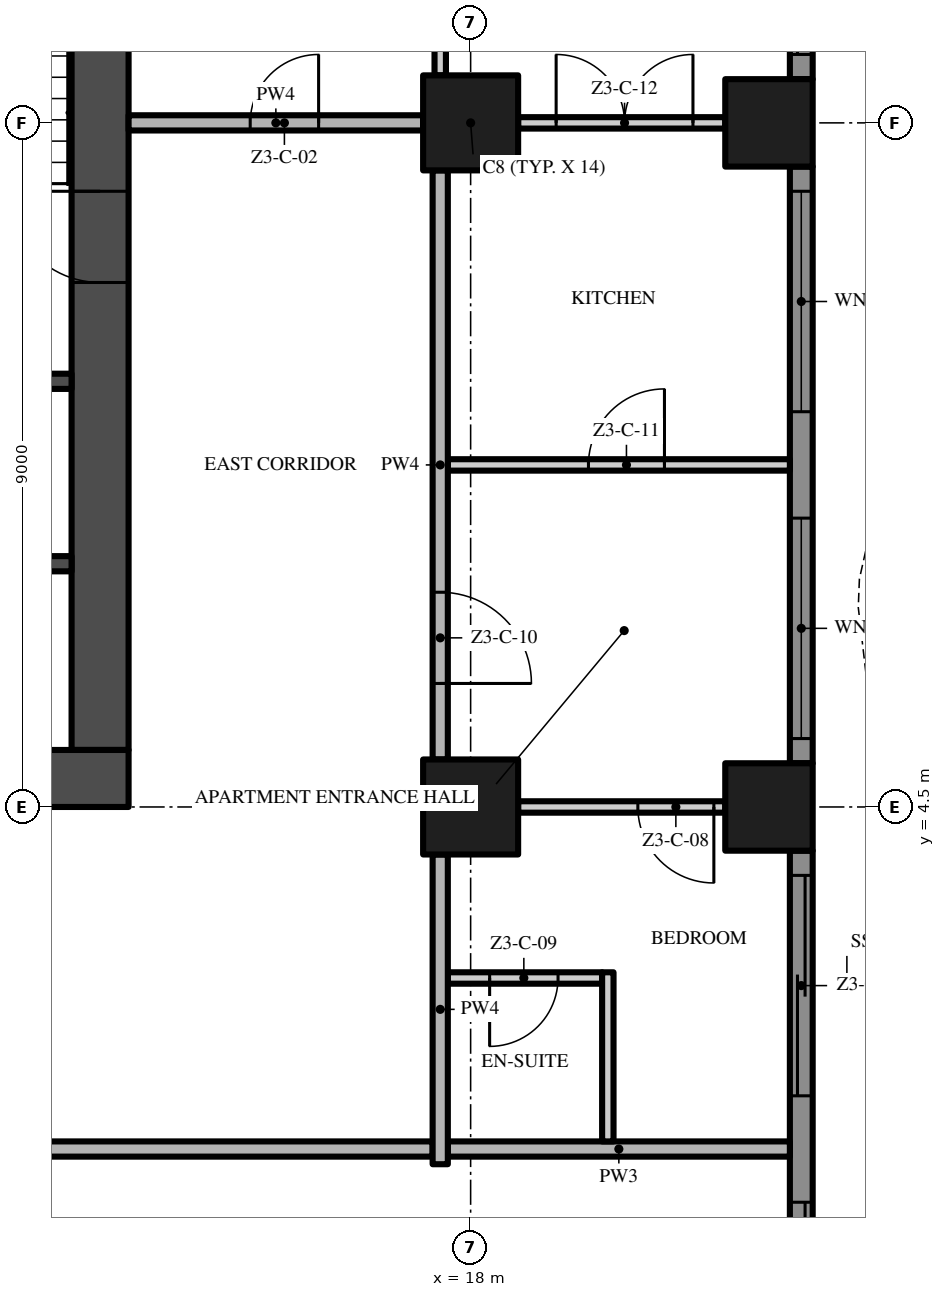
"""IFC4 building model, lengths in metres.
Left out: names, types, materials, properties, quantities, classifications, styles, units other than length and angle.
Written with IfcOpenShell. Run it as: python <this file> out.ifc"""

import sys

from ifc_helpers import new_model, si_unit, direction, frame, frame_2d, origin, origin_2d, place, context, subcontext, project, spatial, polyline, rectangle, outline, extrude, element, fill, save


model = new_model("IFC4")
c1 = context("Model", 3, precision=1e-05, world=origin(), true_north=direction((0.0, 1.0)))
c2 = subcontext(c1, "Body", "Model", "MODEL_VIEW")
j1 = project(units=[si_unit("LENGTHUNIT", "METRE"), si_unit("PLANEANGLEUNIT", "RADIAN")], contexts=[c1])
p1 = place(None, origin())
s1 = spatial("IfcSite", under=j1, at=p1, CompositionType="ELEMENT")
p2 = place(p1, origin())
s2 = spatial("IfcBuilding", under=s1, at=p2, CompositionType="ELEMENT")
p3 = place(p2, frame((0.0, 0.0, 155.4)))
s3 = spatial("IfcBuildingStorey", under=s2, at=p3, CompositionType="ELEMENT", Elevation=155.4)
p4 = place(p3, frame((-13.5, 4.875, -0.3), z_axis=(0.0, 0.0, 1.0), x_axis=(1.0, 0.0, 0.0)))
e1 = element("IfcWall", 1, at=p4, inside=s3, PredefinedType="SHEAR", context=c2, shape_type="SweptSolid", body=[
    extrude(rectangle(XDim=27.0, YDim=0.75, at=frame_2d((13.5, 0.0))), origin(), (0.0, 0.0, 1.0), 3.8),
])
p5 = place(p4, frame((12.0, 0.0, 0.3)))
e2 = element("IfcOpeningElement", 2, at=p5, cuts=e1, PredefinedType="OPENING", context=c2, shape_type="SweptSolid", body=[
    extrude(rectangle(XDim=3.0, YDim=2.4, at=frame_2d((1.5, 1.2))), frame((0.0, 0.385, 0.0), z_axis=(0.0, -1.0, 0.0), x_axis=(1.0, 0.0, 0.0)), (0.0, 0.0, 1.0), 0.77),
])
p6 = place(p4, frame((4.9, 0.0, 0.3)))
e3 = element("IfcOpeningElement", 3, at=p6, cuts=e1, PredefinedType="OPENING", context=c2, shape_type="SweptSolid", body=[
    extrude(rectangle(XDim=1.2, YDim=2.2, at=frame_2d((0.6, 1.1))), frame((0.0, 0.385, 0.0), z_axis=(0.0, -1.0, 0.0), x_axis=(1.0, 0.0, 0.0)), (0.0, 0.0, 1.0), 0.77),
])
p7 = place(p4, frame((20.75, 0.0, 0.3)))
e4 = element("IfcOpeningElement", 4, at=p7, cuts=e1, PredefinedType="OPENING", context=c2, shape_type="SweptSolid", body=[
    extrude(rectangle(XDim=1.5, YDim=2.2, at=frame_2d((0.75, 1.1))), frame((0.0, 0.385, 0.0), z_axis=(0.0, -1.0, 0.0), x_axis=(1.0, 0.0, 0.0)), (0.0, 0.0, 1.0), 0.77),
])
p8 = place(p4, frame((17.4, 0.0, 0.3)))
e5 = element("IfcOpeningElement", 5, at=p8, cuts=e1, PredefinedType="OPENING", context=c2, shape_type="SweptSolid", body=[
    extrude(rectangle(XDim=1.2, YDim=2.2, at=frame_2d((0.6, 1.1))), frame((0.0, 0.385, 0.0), z_axis=(0.0, -1.0, 0.0), x_axis=(1.0, 0.0, 0.0)), (0.0, 0.0, 1.0), 0.77),
])
p9 = place(p3, frame((13.125, 5.25, -0.3), z_axis=(0.0, 0.0, 1.0), x_axis=(0.0, 1.0, 0.0)))
e6 = element("IfcWall", 6, at=p9, inside=s3, PredefinedType="SHEAR", context=c2, shape_type="SweptSolid", body=[
    extrude(rectangle(XDim=16.5, YDim=0.75, at=frame_2d((8.25, 0.0))), origin(), (0.0, 0.0, 1.0), 3.8),
])
p10 = place(p9, frame((6.15, 0.0, 0.3)))
e7 = element("IfcOpeningElement", 7, at=p10, cuts=e6, PredefinedType="OPENING", context=c2, shape_type="SweptSolid", body=[
    extrude(rectangle(XDim=1.2, YDim=2.2, at=frame_2d((0.6, 1.1))), frame((0.0, 0.385, 0.0), z_axis=(0.0, -1.0, 0.0), x_axis=(1.0, 0.0, 0.0)), (0.0, 0.0, 1.0), 0.77),
])
for number, where, z_axis, x_axis in (
    (8, (18.0, 13.5, 0.0), (0.0, 0.0, 1.0), (1.0, 0.0, 0.0)),
    (9, (18.0, 4.5, 0.0), (0.0, 0.0, 1.0), (1.0, 0.0, 0.0)),
):
    element("IfcColumn", number, at=place(p3, frame(where, z_axis=z_axis, x_axis=x_axis)), inside=s3, PredefinedType="COLUMN", context=c2, shape_type="SweptSolid", body=[
        extrude(rectangle(XDim=1.25, YDim=1.25, at=origin_2d()), origin(), (0.0, 0.0, 1.0), 3.5),
    ])
for number, where, z_axis, x_axis in (
    (10, (21.925, 13.5, 0.0), (0.0, 0.0, 1.0), (1.0, 0.0, 0.0)),
    (11, (21.925, 4.5, 0.0), (0.0, 0.0, 1.0), (1.0, 0.0, 0.0)),
):
    element("IfcColumn", number, at=place(p3, frame(where, z_axis=z_axis, x_axis=x_axis)), inside=s3, PredefinedType="COLUMN", context=c2, shape_type="SweptSolid", body=[
        extrude(rectangle(XDim=1.15, YDim=1.15, at=origin_2d()), origin(), (0.0, 0.0, 1.0), 3.5),
    ])
p11 = place(p3, frame((22.35, 3.925, 0.0), z_axis=(0.0, 0.0, 1.0), x_axis=(0.0, -1.0, 0.0)))
e12 = element("IfcWall", 12, at=p11, inside=s3, PredefinedType="SOLIDWALL", context=c2, shape_type="SweptSolid", body=[
    extrude(rectangle(XDim=7.85, YDim=0.3, at=frame_2d((3.925, 0.0))), origin(), (0.0, 0.0, 1.0), 3.5),
])
p12 = place(p11, frame((4.625, 0.0, 0.0)))
e13 = element("IfcOpeningElement", 13, at=p12, cuts=e12, PredefinedType="OPENING", context=c2, shape_type="SweptSolid", body=[
    extrude(rectangle(XDim=2.9, YDim=2.4, at=frame_2d((1.45, 1.2))), frame((0.0, 0.16, 0.0), z_axis=(0.0, -1.0, 0.0), x_axis=(1.0, 0.0, 0.0)), (0.0, 0.0, 1.0), 0.32),
])
p13 = place(p11, frame((0.325, 0.0, 0.0)))
e14 = element("IfcOpeningElement", 14, at=p13, cuts=e12, PredefinedType="OPENING", context=c2, shape_type="SweptSolid", body=[
    extrude(rectangle(XDim=2.9, YDim=2.4, at=frame_2d((1.45, 1.2))), frame((0.0, 0.16, 0.0), z_axis=(0.0, -1.0, 0.0), x_axis=(1.0, 0.0, 0.0)), (0.0, 0.0, 1.0), 0.32),
])
p14 = place(p3, frame((22.35, 12.925, 0.0), z_axis=(0.0, 0.0, 1.0), x_axis=(0.0, -1.0, 0.0)))
e15 = element("IfcWall", 15, at=p14, inside=s3, PredefinedType="SOLIDWALL", context=c2, shape_type="SweptSolid", body=[
    extrude(rectangle(XDim=7.85, YDim=0.3, at=frame_2d((3.925, 0.0))), origin(), (0.0, 0.0, 1.0), 3.5),
])
p15 = place(p14, frame((4.625, 0.0, 0.45)))
e16 = element("IfcOpeningElement", 16, at=p15, cuts=e15, PredefinedType="OPENING", context=c2, shape_type="SweptSolid", body=[
    extrude(rectangle(XDim=2.9, YDim=2.65, at=frame_2d((1.45, 1.325))), frame((0.0, 0.16, 0.0), z_axis=(0.0, -1.0, 0.0), x_axis=(1.0, 0.0, 0.0)), (0.0, 0.0, 1.0), 0.32),
])
p16 = place(p14, frame((0.325, 0.0, 0.45)))
e17 = element("IfcOpeningElement", 17, at=p16, cuts=e15, PredefinedType="OPENING", context=c2, shape_type="SweptSolid", body=[
    extrude(rectangle(XDim=2.9, YDim=2.65, at=frame_2d((1.45, 1.325))), frame((0.0, 0.16, 0.0), z_axis=(0.0, -1.0, 0.0), x_axis=(1.0, 0.0, 0.0)), (0.0, 0.0, 1.0), 0.32),
])
p17 = place(p3, frame((22.35, 18.0, 0.0), z_axis=(0.0, 0.0, 1.0), x_axis=(0.0, -1.0, 0.0)))
e18 = element("IfcWall", 18, at=p17, inside=s3, PredefinedType="SOLIDWALL", context=c2, shape_type="SweptSolid", body=[
    extrude(rectangle(XDim=3.925, YDim=0.3, at=frame_2d((1.962, 0.0))), origin(), (0.0, 0.0, 1.0), 3.5),
])
p18 = place(p17, frame((0.7, 0.0, 0.0)))
e19 = element("IfcOpeningElement", 19, at=p18, cuts=e18, PredefinedType="OPENING", context=c2, shape_type="SweptSolid", body=[
    extrude(rectangle(XDim=2.9, YDim=2.4, at=frame_2d((1.45, 1.2))), frame((0.0, 0.16, 0.0), z_axis=(0.0, -1.0, 0.0), x_axis=(1.0, 0.0, 0.0)), (0.0, 0.0, 1.0), 0.32),
])
p19 = place(p3, origin())
e20 = element("IfcWall", 20, at=p19, inside=s3, PredefinedType="USERDEFINED", context=c2, shape_type="SweptSolid", body=[
    extrude(outline(polyline([(25.149, -13.5), (24.488, -12.0), (23.755, -10.5), (23.231, -9.0), (23.1, -7.875), (23.115, -7.5), (23.451, -6.0), (24.112, -4.5), (24.845, -3.0), (25.369, -1.5), (25.5, -0.375), (25.485, 0.0), (25.149, 1.5), (24.488, 3.0), (23.755, 4.5), (23.231, 6.0), (23.1, 7.125), (23.115, 7.5), (23.451, 9.0), (24.112, 10.5), (24.845, 12.0), (25.369, 13.5), (25.5, 14.625), (25.485, 15.0), (25.149, 16.5), (24.488, 18.0), (24.259, 17.899), (24.91, 16.421), (25.236, 14.967), (25.249, 14.635), (25.124, 13.556), (24.614, 12.096), (23.885, 10.605), (23.213, 9.079), (22.866, 7.533), (22.849, 7.115), (22.986, 5.944), (23.524, 4.404), (24.261, 2.895), (24.91, 1.421), (25.236, -0.033), (25.249, -0.365), (25.124, -1.444), (24.614, -2.904), (23.885, -4.395), (23.213, -5.921), (22.866, -7.467), (22.849, -7.885), (22.986, -9.056), (23.524, -10.596), (24.261, -12.105), (24.92, -13.601), (25.149, -13.5)])), origin(), (0.0, 0.0, 1.0), 0.9),
])
for number, where, z_axis, x_axis in (
    (21, (9.65, 7.7, 0.0), (0.0, 0.0, 1.0), (1.0, 0.0, 0.0)),
    (22, (9.65, 10.1, 0.0), (0.0, 0.0, 1.0), (1.0, 0.0, 0.0)),
):
    element("IfcWall", number, at=place(p3, frame(where, z_axis=z_axis, x_axis=x_axis)), inside=s3, PredefinedType="SHEAR", context=c2, shape_type="SweptSolid", body=[
        extrude(rectangle(XDim=3.1, YDim=0.2, at=frame_2d((1.55, 0.0))), origin(), (0.0, 0.0, 1.0), 3.5),
    ])
p20 = place(p3, frame((17.5, 0.0, 0.0), z_axis=(0.0, 0.0, 1.0), x_axis=(-1.0, 0.0, 0.0)))
e23 = element("IfcWall", 23, at=p20, inside=s3, PredefinedType="PARTITIONING", context=c2, shape_type="SweptSolid", body=[
    extrude(rectangle(XDim=35.0, YDim=0.2, at=frame_2d((17.5, 0.0))), origin(), (0.0, 0.0, 1.0), 3.5),
])
p21 = place(p20, frame((16.75, 0.0, 0.0)))
e24 = element("IfcOpeningElement", 24, at=p21, cuts=e23, PredefinedType="OPENING", context=c2, shape_type="SweptSolid", body=[
    extrude(rectangle(XDim=1.5, YDim=2.4, at=frame_2d((0.75, 1.2))), frame((0.0, 0.11, 0.0), z_axis=(0.0, -1.0, 0.0), x_axis=(1.0, 0.0, 0.0)), (0.0, 0.0, 1.0), 0.22),
])
p22 = place(p3, frame((17.7, 0.0, 0.0), z_axis=(0.0, 0.0, 1.0), x_axis=(1.0, 0.0, 0.0)))
e25 = element("IfcWall", 25, at=p22, inside=s3, PredefinedType="PARTITIONING", context=c2, shape_type="SweptSolid", body=[
    extrude(rectangle(XDim=4.5, YDim=0.2, at=frame_2d((2.25, 0.0))), origin(), (0.0, 0.0, 1.0), 3.5),
])
p23 = place(p3, frame((19.73, 2.25, 0.0), z_axis=(0.0, 0.0, 1.0), x_axis=(-1.0, 0.0, 0.0)))
e26 = element("IfcWall", 26, at=p23, inside=s3, PredefinedType="PARTITIONING", context=c2, shape_type="SweptSolid", body=[
    extrude(rectangle(XDim=2.03, YDim=0.15, at=frame_2d((1.015, 0.0))), origin(), (0.0, 0.0, 1.0), 3.5),
])
p24 = place(p23, frame((0.58, 0.0, 0.0)))
e27 = element("IfcOpeningElement", 27, at=p24, cuts=e26, PredefinedType="OPENING", context=c2, shape_type="SweptSolid", body=[
    extrude(rectangle(XDim=0.9, YDim=2.1, at=frame_2d((0.45, 1.05))), frame((0.0, 0.085, 0.0), z_axis=(0.0, -1.0, 0.0), x_axis=(1.0, 0.0, 0.0)), (0.0, 0.0, 1.0), 0.17),
])
p25 = place(p3, frame((21.35, 4.5, 0.0), z_axis=(0.0, 0.0, 1.0), x_axis=(-1.0, 0.0, 0.0)))
e28 = element("IfcWall", 28, at=p25, inside=s3, PredefinedType="PARTITIONING", context=c2, shape_type="SweptSolid", body=[
    extrude(rectangle(XDim=2.725, YDim=0.15, at=frame_2d((1.363, 0.0))), origin(), (0.0, 0.0, 1.0), 3.5),
])
p26 = place(p25, frame((0.15, 0.0, 0.0)))
e29 = element("IfcOpeningElement", 29, at=p26, cuts=e28, PredefinedType="OPENING", context=c2, shape_type="SweptSolid", body=[
    extrude(rectangle(XDim=1.0, YDim=2.4, at=frame_2d((0.5, 1.2))), frame((0.0, 0.085, 0.0), z_axis=(0.0, -1.0, 0.0), x_axis=(1.0, 0.0, 0.0)), (0.0, 0.0, 1.0), 0.17),
])
p27 = place(p3, frame((17.7, 9.0, 0.0), z_axis=(0.0, 0.0, 1.0), x_axis=(1.0, 0.0, 0.0)))
e30 = element("IfcWall", 30, at=p27, inside=s3, PredefinedType="PARTITIONING", context=c2, shape_type="SweptSolid", body=[
    extrude(rectangle(XDim=4.5, YDim=0.15, at=frame_2d((2.25, 0.0))), origin(), (0.0, 0.0, 1.0), 3.5),
])
p28 = place(p27, frame((1.85, 0.0, 0.0)))
e31 = element("IfcOpeningElement", 31, at=p28, cuts=e30, PredefinedType="OPENING", context=c2, shape_type="SweptSolid", body=[
    extrude(rectangle(XDim=1.0, YDim=2.4, at=frame_2d((0.5, 1.2))), frame((0.0, 0.085, 0.0), z_axis=(0.0, -1.0, 0.0), x_axis=(1.0, 0.0, 0.0)), (0.0, 0.0, 1.0), 0.17),
])
p29 = place(p3, frame((13.5, 13.5, 0.0), z_axis=(0.0, 0.0, 1.0), x_axis=(1.0, 0.0, 0.0)))
e32 = element("IfcWall", 32, at=p29, inside=s3, PredefinedType="PARTITIONING", context=c2, shape_type="SweptSolid", body=[
    extrude(rectangle(XDim=3.875, YDim=0.2, at=frame_2d((1.938, 0.0))), origin(), (0.0, 0.0, 1.0), 3.5),
])
p30 = place(p29, frame((1.6, 0.0, 0.0)))
e33 = element("IfcOpeningElement", 33, at=p30, cuts=e32, PredefinedType="OPENING", context=c2, shape_type="SweptSolid", body=[
    extrude(rectangle(XDim=0.9, YDim=2.1, at=frame_2d((0.45, 1.05))), frame((0.0, 0.11, 0.0), z_axis=(0.0, -1.0, 0.0), x_axis=(1.0, 0.0, 0.0)), (0.0, 0.0, 1.0), 0.22),
])
p31 = place(p3, frame((18.625, 13.5, 0.0), z_axis=(0.0, 0.0, 1.0), x_axis=(1.0, 0.0, 0.0)))
e34 = element("IfcWall", 34, at=p31, inside=s3, PredefinedType="PARTITIONING", context=c2, shape_type="SweptSolid", body=[
    extrude(rectangle(XDim=2.725, YDim=0.15, at=frame_2d((1.363, 0.0))), origin(), (0.0, 0.0, 1.0), 3.5),
])
p32 = place(p31, frame((0.5, 0.0, 0.0)))
e35 = element("IfcOpeningElement", 35, at=p32, cuts=e34, PredefinedType="OPENING", context=c2, shape_type="SweptSolid", body=[
    extrude(rectangle(XDim=1.8, YDim=2.4, at=frame_2d((0.9, 1.2))), frame((0.0, 0.085, 0.0), z_axis=(0.0, -1.0, 0.0), x_axis=(1.0, 0.0, 0.0)), (0.0, 0.0, 1.0), 0.17),
])
p33 = place(p3, frame((17.6, -0.2, 0.0), z_axis=(0.0, 0.0, 1.0), x_axis=(0.0, 1.0, 0.0)))
e36 = element("IfcWall", 36, at=p33, inside=s3, PredefinedType="PARTITIONING", context=c2, shape_type="SweptSolid", body=[
    extrude(rectangle(XDim=4.075, YDim=0.2, at=frame_2d((2.038, 0.0))), origin(), (0.0, 0.0, 1.0), 3.5),
])
p34 = place(p3, frame((17.6, 12.875, 0.0), z_axis=(0.0, 0.0, 1.0), x_axis=(0.0, -1.0, 0.0)))
e37 = element("IfcWall", 37, at=p34, inside=s3, PredefinedType="PARTITIONING", context=c2, shape_type="SweptSolid", body=[
    extrude(rectangle(XDim=7.75, YDim=0.2, at=frame_2d((3.875, 0.0))), origin(), (0.0, 0.0, 1.0), 3.5),
])
p35 = place(p34, frame((5.55, 0.0, 0.0)))
e38 = element("IfcOpeningElement", 38, at=p35, cuts=e37, PredefinedType="OPENING", context=c2, shape_type="SweptSolid", body=[
    extrude(rectangle(XDim=1.2, YDim=2.4, at=frame_2d((0.6, 1.2))), frame((0.0, 0.11, 0.0), z_axis=(0.0, -1.0, 0.0), x_axis=(1.0, 0.0, 0.0)), (0.0, 0.0, 1.0), 0.22),
])
p36 = place(p3, frame((17.6, 14.125, 0.0), z_axis=(0.0, 0.0, 1.0), x_axis=(0.0, 1.0, 0.0)))
e39 = element("IfcWall", 39, at=p36, inside=s3, PredefinedType="PARTITIONING", context=c2, shape_type="SweptSolid", body=[
    extrude(rectangle(XDim=3.3, YDim=0.15, at=frame_2d((1.65, 0.0))), origin(), (0.0, 0.0, 1.0), 3.5),
])
p37 = place(p3, frame((19.805, 0.1, 0.0), z_axis=(0.0, 0.0, 1.0), x_axis=(0.0, 1.0, 0.0)))
e40 = element("IfcWall", 40, at=p37, inside=s3, PredefinedType="PARTITIONING", context=c2, shape_type="SweptSolid", body=[
    extrude(rectangle(XDim=2.225, YDim=0.15, at=frame_2d((1.113, 0.0))), origin(), (0.0, 0.0, 1.0), 3.5),
])
p38 = place(p12, origin())
e41 = element("IfcDoor", 41, at=p38, inside=s3, OperationType="SINGLE_SWING_LEFT", PredefinedType="DOOR", context=c2, shape_type="SweptSolid", body=[
    extrude(rectangle(XDim=2.9, YDim=2.4, at=frame_2d((1.45, 1.2))), frame((0.0, 0.025, 0.0), z_axis=(0.0, -1.0, 0.0), x_axis=(1.0, 0.0, 0.0)), (0.0, 0.0, 1.0), 0.05),
])
fill(e13, e41)
p39 = place(p13, origin())
e42 = element("IfcDoor", 42, at=p39, inside=s3, OperationType="SINGLE_SWING_LEFT", PredefinedType="DOOR", context=c2, shape_type="SweptSolid", body=[
    extrude(rectangle(XDim=2.9, YDim=2.4, at=frame_2d((1.45, 1.2))), frame((0.0, 0.025, 0.0), z_axis=(0.0, -1.0, 0.0), x_axis=(1.0, 0.0, 0.0)), (0.0, 0.0, 1.0), 0.05),
])
fill(e14, e42)
p40 = place(p15, origin())
e43 = element("IfcWindow", 43, at=p40, inside=s3, PartitioningType="SINGLE_PANEL", PredefinedType="WINDOW", context=c2, shape_type="SweptSolid", body=[
    extrude(rectangle(XDim=2.9, YDim=2.65, at=frame_2d((1.45, 1.325))), frame((0.0, 0.03, 0.0), z_axis=(0.0, -1.0, 0.0), x_axis=(1.0, 0.0, 0.0)), (0.0, 0.0, 1.0), 0.06),
])
fill(e16, e43)
p41 = place(p16, origin())
e44 = element("IfcWindow", 44, at=p41, inside=s3, PartitioningType="SINGLE_PANEL", PredefinedType="WINDOW", context=c2, shape_type="SweptSolid", body=[
    extrude(rectangle(XDim=2.9, YDim=2.65, at=frame_2d((1.45, 1.325))), frame((0.0, 0.03, 0.0), z_axis=(0.0, -1.0, 0.0), x_axis=(1.0, 0.0, 0.0)), (0.0, 0.0, 1.0), 0.06),
])
fill(e17, e44)
p42 = place(p18, origin())
e45 = element("IfcDoor", 45, at=p42, inside=s3, OperationType="SINGLE_SWING_LEFT", PredefinedType="DOOR", context=c2, shape_type="SweptSolid", body=[
    extrude(rectangle(XDim=2.9, YDim=2.4, at=frame_2d((1.45, 1.2))), frame((0.0, 0.025, 0.0), z_axis=(0.0, -1.0, 0.0), x_axis=(1.0, 0.0, 0.0)), (0.0, 0.0, 1.0), 0.05),
])
fill(e19, e45)
p43 = place(p10, frame((1.2, 0.0, 0.0), z_axis=(0.0, 0.0, 1.0), x_axis=(-1.0, 0.0, 0.0)))
e46 = element("IfcDoor", 46, at=p43, inside=s3, OperationType="SINGLE_SWING_LEFT", PredefinedType="DOOR", context=c2, shape_type="SweptSolid", body=[
    extrude(rectangle(XDim=1.2, YDim=2.2, at=frame_2d((0.6, 1.1))), frame((0.0, 0.025, 0.0), z_axis=(0.0, -1.0, 0.0), x_axis=(1.0, 0.0, 0.0)), (0.0, 0.0, 1.0), 0.05),
])
fill(e7, e46)
p44 = place(p30, origin())
e47 = element("IfcDoor", 47, at=p44, inside=s3, OperationType="SINGLE_SWING_RIGHT", PredefinedType="DOOR", context=c2, shape_type="SweptSolid", body=[
    extrude(rectangle(XDim=0.9, YDim=2.1, at=frame_2d((0.45, 1.05))), frame((0.0, 0.025, 0.0), z_axis=(0.0, -1.0, 0.0), x_axis=(1.0, 0.0, 0.0)), (0.0, 0.0, 1.0), 0.05),
])
fill(e33, e47)
p45 = place(p26, origin())
e48 = element("IfcDoor", 48, at=p45, inside=s3, OperationType="SINGLE_SWING_LEFT", PredefinedType="DOOR", context=c2, shape_type="SweptSolid", body=[
    extrude(rectangle(XDim=1.0, YDim=2.4, at=frame_2d((0.5, 1.2))), frame((0.0, 0.025, 0.0), z_axis=(0.0, -1.0, 0.0), x_axis=(1.0, 0.0, 0.0)), (0.0, 0.0, 1.0), 0.05),
])
fill(e29, e48)
p46 = place(p24, origin())
e49 = element("IfcDoor", 49, at=p46, inside=s3, OperationType="SINGLE_SWING_RIGHT", PredefinedType="DOOR", context=c2, shape_type="SweptSolid", body=[
    extrude(rectangle(XDim=0.9, YDim=2.1, at=frame_2d((0.45, 1.05))), frame((0.0, 0.025, 0.0), z_axis=(0.0, -1.0, 0.0), x_axis=(1.0, 0.0, 0.0)), (0.0, 0.0, 1.0), 0.05),
])
fill(e27, e49)
p47 = place(p35, origin())
e50 = element("IfcDoor", 50, at=p47, inside=s3, OperationType="SINGLE_SWING_RIGHT", PredefinedType="DOOR", context=c2, shape_type="SweptSolid", body=[
    extrude(rectangle(XDim=1.2, YDim=2.4, at=frame_2d((0.6, 1.2))), frame((0.0, 0.025, 0.0), z_axis=(0.0, -1.0, 0.0), x_axis=(1.0, 0.0, 0.0)), (0.0, 0.0, 1.0), 0.05),
])
fill(e38, e50)
p48 = place(p28, origin())
e51 = element("IfcDoor", 51, at=p48, inside=s3, OperationType="SINGLE_SWING_RIGHT", PredefinedType="DOOR", context=c2, shape_type="SweptSolid", body=[
    extrude(rectangle(XDim=1.0, YDim=2.4, at=frame_2d((0.5, 1.2))), frame((0.0, 0.025, 0.0), z_axis=(0.0, -1.0, 0.0), x_axis=(1.0, 0.0, 0.0)), (0.0, 0.0, 1.0), 0.05),
])
fill(e31, e51)
p49 = place(p32, origin())
e52 = element("IfcDoor", 52, at=p49, inside=s3, OperationType="DOUBLE_DOOR_SINGLE_SWING", PredefinedType="DOOR", context=c2, shape_type="SweptSolid", body=[
    extrude(rectangle(XDim=1.8, YDim=2.4, at=frame_2d((0.9, 1.2))), frame((0.0, 0.025, 0.0), z_axis=(0.0, -1.0, 0.0), x_axis=(1.0, 0.0, 0.0)), (0.0, 0.0, 1.0), 0.05),
])
fill(e35, e52)
save(model, sys.argv[1])
